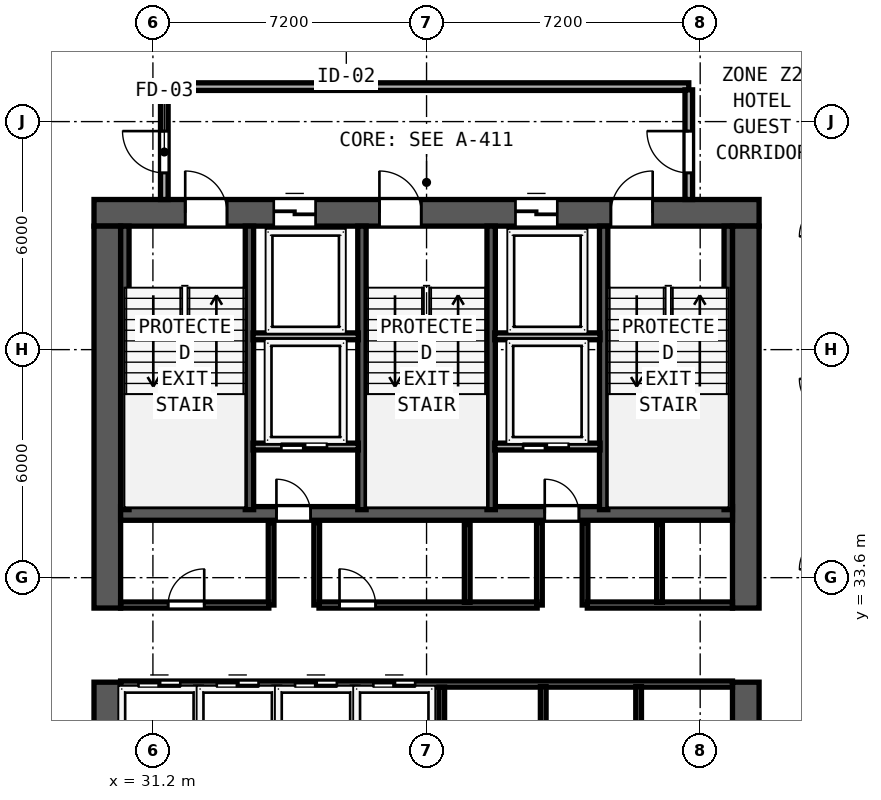
"""IFC4 building model, lengths in metres.
Left out: names, types, materials, properties, quantities, classifications, styles, units other than length and angle.
Written with IfcOpenShell. Run it as: python <this file> out.ifc"""

import sys

from ifc_helpers import new_model, si_unit, direction, frame, frame_2d, origin, place, context, subcontext, project, spatial, rectangle, extrude, element, fill, save


model = new_model("IFC4")
c1 = context("Model", 3, precision=1e-05, world=origin(), true_north=direction((0.0, 1.0)))
c2 = subcontext(c1, "Body", "Model", "MODEL_VIEW")
j1 = project(units=[si_unit("LENGTHUNIT", "METRE"), si_unit("PLANEANGLEUNIT", "RADIAN")], contexts=[c1])
p1 = place(None, origin())
s1 = spatial("IfcSite", under=j1, at=p1, CompositionType="ELEMENT")
p2 = place(p1, origin())
s2 = spatial("IfcBuilding", under=s1, at=p2, CompositionType="ELEMENT")
p3 = place(p2, frame((0.0, 0.0, 121.2)))
s3 = spatial("IfcBuildingStorey", under=s2, at=p3, CompositionType="ELEMENT", Elevation=121.2)
p4 = place(p3, frame((29.65, 43.2, 0.0), z_axis=(0.0, 0.0, 1.0), x_axis=(1.0, 0.0, 0.0)))
e1 = element("IfcWall", 1, at=p4, inside=s3, PredefinedType="SHEAR", context=c2, shape_type="SweptSolid", body=[
    extrude(rectangle(XDim=17.5, YDim=0.7, at=frame_2d((8.75, 0.0))), origin(), (0.0, 0.0, 1.0), 3.6),
])
p5 = place(p4, frame((2.4, 0.0, 0.0)))
e2 = element("IfcOpeningElement", 2, at=p5, cuts=e1, PredefinedType="OPENING", context=c2, shape_type="SweptSolid", body=[
    extrude(rectangle(XDim=1.1, YDim=2.15, at=frame_2d((0.55, 1.075))), frame((0.0, 0.36, 0.0), z_axis=(0.0, -1.0, 0.0), x_axis=(1.0, 0.0, 0.0)), (0.0, 0.0, 1.0), 0.72),
])
p6 = place(p4, frame((7.51, 0.0, 0.0)))
e3 = element("IfcOpeningElement", 3, at=p6, cuts=e1, PredefinedType="OPENING", context=c2, shape_type="SweptSolid", body=[
    extrude(rectangle(XDim=1.1, YDim=2.15, at=frame_2d((0.55, 1.075))), frame((0.0, 0.36, 0.0), z_axis=(0.0, -1.0, 0.0), x_axis=(1.0, 0.0, 0.0)), (0.0, 0.0, 1.0), 0.72),
])
p7 = place(p4, frame((13.6, 0.0, 0.0)))
e4 = element("IfcOpeningElement", 4, at=p7, cuts=e1, PredefinedType="OPENING", context=c2, shape_type="SweptSolid", body=[
    extrude(rectangle(XDim=1.1, YDim=2.15, at=frame_2d((0.55, 1.075))), frame((0.0, 0.36, 0.0), z_axis=(0.0, -1.0, 0.0), x_axis=(1.0, 0.0, 0.0)), (0.0, 0.0, 1.0), 0.72),
])
p8 = place(p4, frame((4.73, 0.0, 0.0)))
e5 = element("IfcOpeningElement", 5, at=p8, cuts=e1, PredefinedType="OPENING", context=c2, shape_type="SweptSolid", body=[
    extrude(rectangle(XDim=1.1, YDim=2.2, at=frame_2d((0.55, 1.1))), frame((0.0, 0.36, 0.0), z_axis=(0.0, -1.0, 0.0), x_axis=(1.0, 0.0, 0.0)), (0.0, 0.0, 1.0), 0.72),
])
p9 = place(p4, frame((11.09, 0.0, 0.0)))
e6 = element("IfcOpeningElement", 6, at=p9, cuts=e1, PredefinedType="OPENING", context=c2, shape_type="SweptSolid", body=[
    extrude(rectangle(XDim=1.1, YDim=2.2, at=frame_2d((0.55, 1.1))), frame((0.0, 0.36, 0.0), z_axis=(0.0, -1.0, 0.0), x_axis=(1.0, 0.0, 0.0)), (0.0, 0.0, 1.0), 0.72),
])
p10 = place(p3, frame((30.0, 26.75, 0.0), z_axis=(0.0, 0.0, 1.0), x_axis=(0.0, 1.0, 0.0)))
e7 = element("IfcWall", 7, at=p10, inside=s3, PredefinedType="SHEAR", context=c2, shape_type="SweptSolid", body=[
    extrude(rectangle(XDim=4.1, YDim=0.7, at=frame_2d((2.05, 0.0))), origin(), (0.0, 0.0, 1.0), 3.6),
])
p11 = place(p3, frame((30.0, 32.8, 0.0), z_axis=(0.0, 0.0, 1.0), x_axis=(0.0, 1.0, 0.0)))
e8 = element("IfcWall", 8, at=p11, inside=s3, PredefinedType="SHEAR", context=c2, shape_type="SweptSolid", body=[
    extrude(rectangle(XDim=10.05, YDim=0.7, at=frame_2d((5.025, 0.0))), origin(), (0.0, 0.0, 1.0), 3.6),
])
p12 = place(p3, frame((46.8, 26.75, 0.0), z_axis=(0.0, 0.0, 1.0), x_axis=(0.0, 1.0, 0.0)))
e9 = element("IfcWall", 9, at=p12, inside=s3, PredefinedType="SHEAR", context=c2, shape_type="SweptSolid", body=[
    extrude(rectangle(XDim=4.1, YDim=0.7, at=frame_2d((2.05, 0.0))), origin(), (0.0, 0.0, 1.0), 3.6),
])
p13 = place(p3, frame((46.8, 32.8, 0.0), z_axis=(0.0, 0.0, 1.0), x_axis=(0.0, 1.0, 0.0)))
e10 = element("IfcWall", 10, at=p13, inside=s3, PredefinedType="SHEAR", context=c2, shape_type="SweptSolid", body=[
    extrude(rectangle(XDim=10.05, YDim=0.7, at=frame_2d((5.025, 0.0))), origin(), (0.0, 0.0, 1.0), 3.6),
])
p14 = place(p3, frame((30.35, 35.29, 0.0), z_axis=(0.0, 0.0, 1.0), x_axis=(1.0, 0.0, 0.0)))
e11 = element("IfcWall", 11, at=p14, inside=s3, PredefinedType="SHEAR", context=c2, shape_type="SweptSolid", body=[
    extrude(rectangle(XDim=16.1, YDim=0.36, at=frame_2d((8.05, 0.0))), origin(), (0.0, 0.0, 1.0), 3.6),
])
p15 = place(p14, frame((5.0, 0.0, 0.0), z_axis=(0.0, 0.0, 1.0), x_axis=(-1.0, 0.0, 0.0)))
e12 = element("IfcOpeningElement", 12, at=p15, cuts=e11, PredefinedType="OPENING", context=c2, shape_type="SweptSolid", body=[
    extrude(rectangle(XDim=0.9, YDim=2.1, at=frame_2d((0.45, 1.05))), frame((0.0, 0.19, 0.0), z_axis=(0.0, -1.0, 0.0), x_axis=(1.0, 0.0, 0.0)), (0.0, 0.0, 1.0), 0.38),
])
p16 = place(p14, frame((12.06, 0.0, 0.0), z_axis=(0.0, 0.0, 1.0), x_axis=(-1.0, 0.0, 0.0)))
e13 = element("IfcOpeningElement", 13, at=p16, cuts=e11, PredefinedType="OPENING", context=c2, shape_type="SweptSolid", body=[
    extrude(rectangle(XDim=0.9, YDim=2.1, at=frame_2d((0.45, 1.05))), frame((0.0, 0.19, 0.0), z_axis=(0.0, -1.0, 0.0), x_axis=(1.0, 0.0, 0.0)), (0.0, 0.0, 1.0), 0.38),
])
for number, where, z_axis, x_axis in (
    (14, (30.462, 35.39, 0.0), (0.0, 0.0, 1.0), (0.0, 1.0, 0.0)),
    (15, (33.74, 35.39, 0.0), (0.0, 0.0, 1.0), (0.0, 1.0, 0.0)),
    (16, (36.7, 35.39, 0.0), (0.0, 0.0, 1.0), (0.0, 1.0, 0.0)),
    (17, (40.1, 35.39, 0.0), (0.0, 0.0, 1.0), (0.0, 1.0, 0.0)),
    (18, (43.06, 35.39, 0.0), (0.0, 0.0, 1.0), (0.0, 1.0, 0.0)),
    (19, (46.338, 35.39, 0.0), (0.0, 0.0, 1.0), (0.0, 1.0, 0.0)),
):
    element("IfcWall", number, at=place(p3, frame(where, z_axis=z_axis, x_axis=x_axis)), inside=s3, PredefinedType="SHEAR", context=c2, shape_type="SweptSolid", body=[
        extrude(rectangle(XDim=7.46, YDim=0.22, at=frame_2d((3.73, 0.0))), origin(), (0.0, 0.0, 1.0), 3.6),
    ])
p17 = place(p3, frame((31.5, 46.52, 0.0), z_axis=(0.0, 0.0, 1.0), x_axis=(1.0, 0.0, 0.0)))
e20 = element("IfcWall", 20, at=p17, inside=s3, PredefinedType="SOLIDWALL", context=c2, shape_type="SweptSolid", body=[
    extrude(rectangle(XDim=13.8, YDim=0.2, at=frame_2d((6.9, 0.0))), origin(), (0.0, 0.0, 1.0), 3.6),
])
p18 = place(p3, frame((31.5, 43.55, 0.0), z_axis=(0.0, 0.0, 1.0), x_axis=(0.0, 1.0, 0.0)))
e21 = element("IfcWall", 21, at=p18, inside=s3, PredefinedType="SOLIDWALL", context=c2, shape_type="SweptSolid", body=[
    extrude(rectangle(XDim=2.885, YDim=0.2, at=frame_2d((1.442, 0.0))), origin(), (0.0, 0.0, 1.0), 3.6),
])
p19 = place(p18, frame((1.8, 0.0, 0.0), z_axis=(0.0, 0.0, 1.0), x_axis=(-1.0, 0.0, 0.0)))
e22 = element("IfcOpeningElement", 22, at=p19, cuts=e21, PredefinedType="OPENING", context=c2, shape_type="SweptSolid", body=[
    extrude(rectangle(XDim=1.1, YDim=2.15, at=frame_2d((0.55, 1.075))), frame((0.0, 0.11, 0.0), z_axis=(0.0, -1.0, 0.0), x_axis=(1.0, 0.0, 0.0)), (0.0, 0.0, 1.0), 0.22),
])
p20 = place(p3, frame((45.3, 43.55, 0.0), z_axis=(0.0, 0.0, 1.0), x_axis=(0.0, 1.0, 0.0)))
e23 = element("IfcWall", 23, at=p20, inside=s3, PredefinedType="SOLIDWALL", context=c2, shape_type="SweptSolid", body=[
    extrude(rectangle(XDim=2.885, YDim=0.2, at=frame_2d((1.442, 0.0))), origin(), (0.0, 0.0, 1.0), 3.6),
])
p21 = place(p20, frame((0.7, 0.0, 0.0)))
e24 = element("IfcOpeningElement", 24, at=p21, cuts=e23, PredefinedType="OPENING", context=c2, shape_type="SweptSolid", body=[
    extrude(rectangle(XDim=1.1, YDim=2.15, at=frame_2d((0.55, 1.075))), frame((0.0, 0.11, 0.0), z_axis=(0.0, -1.0, 0.0), x_axis=(1.0, 0.0, 0.0)), (0.0, 0.0, 1.0), 0.22),
])
for number, where, z_axis, x_axis in (
    (25, (33.835, 39.95, 0.0), (0.0, 0.0, 1.0), (1.0, 0.0, 0.0)),
    (26, (40.195, 39.95, 0.0), (0.0, 0.0, 1.0), (1.0, 0.0, 0.0)),
):
    element("IfcWall", number, at=place(p3, frame(where, z_axis=z_axis, x_axis=x_axis)), inside=s3, PredefinedType="SOLIDWALL", context=c2, shape_type="SweptSolid", body=[
        extrude(rectangle(XDim=2.77, YDim=0.18, at=frame_2d((1.385, 0.0))), origin(), (0.0, 0.0, 1.0), 3.6),
    ])
p22 = place(p3, frame((33.835, 37.05, 0.0), z_axis=(0.0, 0.0, 1.0), x_axis=(1.0, 0.0, 0.0)))
e27 = element("IfcWall", 27, at=p22, inside=s3, PredefinedType="SOLIDWALL", context=c2, shape_type="SweptSolid", body=[
    extrude(rectangle(XDim=2.77, YDim=0.18, at=frame_2d((1.385, 0.0))), origin(), (0.0, 0.0, 1.0), 3.6),
])
p23 = place(p22, frame((1.945, 0.0, 0.0), z_axis=(0.0, 0.0, 1.0), x_axis=(-1.0, 0.0, 0.0)))
e28 = element("IfcOpeningElement", 28, at=p23, cuts=e27, PredefinedType="OPENING", context=c2, shape_type="SweptSolid", body=[
    extrude(rectangle(XDim=1.2, YDim=2.2, at=frame_2d((0.6, 1.1))), frame((0.0, 0.1, 0.0), z_axis=(0.0, -1.0, 0.0), x_axis=(1.0, 0.0, 0.0)), (0.0, 0.0, 1.0), 0.2),
])
for number, where, z_axis, x_axis in (
    (29, (34.31, 32.88, 0.0), (0.0, 0.0, 1.0), (0.0, 1.0, 0.0)),
    (30, (35.51, 32.88, 0.0), (0.0, 0.0, 1.0), (0.0, 1.0, 0.0)),
):
    element("IfcWall", number, at=place(p3, frame(where, z_axis=z_axis, x_axis=x_axis)), inside=s3, PredefinedType="SOLIDWALL", context=c2, shape_type="SweptSolid", body=[
        extrude(rectangle(XDim=2.17, YDim=0.15, at=frame_2d((1.085, 0.0))), origin(), (0.0, 0.0, 1.0), 3.6),
    ])
p24 = place(p3, frame((40.195, 37.05, 0.0), z_axis=(0.0, 0.0, 1.0), x_axis=(1.0, 0.0, 0.0)))
e31 = element("IfcWall", 31, at=p24, inside=s3, PredefinedType="SOLIDWALL", context=c2, shape_type="SweptSolid", body=[
    extrude(rectangle(XDim=2.77, YDim=0.18, at=frame_2d((1.385, 0.0))), origin(), (0.0, 0.0, 1.0), 3.6),
])
p25 = place(p24, frame((1.945, 0.0, 0.0), z_axis=(0.0, 0.0, 1.0), x_axis=(-1.0, 0.0, 0.0)))
e32 = element("IfcOpeningElement", 32, at=p25, cuts=e31, PredefinedType="OPENING", context=c2, shape_type="SweptSolid", body=[
    extrude(rectangle(XDim=1.2, YDim=2.2, at=frame_2d((0.6, 1.1))), frame((0.0, 0.1, 0.0), z_axis=(0.0, -1.0, 0.0), x_axis=(1.0, 0.0, 0.0)), (0.0, 0.0, 1.0), 0.2),
])
for number, where, z_axis, x_axis in (
    (33, (41.37, 32.88, 0.0), (0.0, 0.0, 1.0), (0.0, 1.0, 0.0)),
    (34, (42.57, 32.88, 0.0), (0.0, 0.0, 1.0), (0.0, 1.0, 0.0)),
):
    element("IfcWall", number, at=place(p3, frame(where, z_axis=z_axis, x_axis=x_axis)), inside=s3, PredefinedType="SOLIDWALL", context=c2, shape_type="SweptSolid", body=[
        extrude(rectangle(XDim=2.17, YDim=0.15, at=frame_2d((1.085, 0.0))), origin(), (0.0, 0.0, 1.0), 3.6),
    ])
p26 = place(p3, frame((30.35, 32.88, 0.0), z_axis=(0.0, 0.0, 1.0), x_axis=(1.0, 0.0, 0.0)))
e35 = element("IfcWall", 35, at=p26, inside=s3, PredefinedType="SOLIDWALL", context=c2, shape_type="SweptSolid", body=[
    extrude(rectangle(XDim=3.9, YDim=0.16, at=frame_2d((1.95, 0.0))), origin(), (0.0, 0.0, 1.0), 3.6),
])
p27 = place(p26, frame((2.2, 0.0, 0.0), z_axis=(0.0, 0.0, 1.0), x_axis=(-1.0, 0.0, 0.0)))
e36 = element("IfcOpeningElement", 36, at=p27, cuts=e35, PredefinedType="OPENING", context=c2, shape_type="SweptSolid", body=[
    extrude(rectangle(XDim=0.95, YDim=2.12, at=frame_2d((0.475, 1.06))), frame((0.0, 0.09, 0.0), z_axis=(0.0, -1.0, 0.0), x_axis=(1.0, 0.0, 0.0)), (0.0, 0.0, 1.0), 0.18),
])
p28 = place(p3, frame((35.57, 32.88, 0.0), z_axis=(0.0, 0.0, 1.0), x_axis=(1.0, 0.0, 0.0)))
e37 = element("IfcWall", 37, at=p28, inside=s3, PredefinedType="SOLIDWALL", context=c2, shape_type="SweptSolid", body=[
    extrude(rectangle(XDim=5.74, YDim=0.16, at=frame_2d((2.87, 0.0))), origin(), (0.0, 0.0, 1.0), 3.6),
])
p29 = place(p28, frame((1.49, 0.0, 0.0), z_axis=(0.0, 0.0, 1.0), x_axis=(-1.0, 0.0, 0.0)))
e38 = element("IfcOpeningElement", 38, at=p29, cuts=e37, PredefinedType="OPENING", context=c2, shape_type="SweptSolid", body=[
    extrude(rectangle(XDim=0.95, YDim=2.12, at=frame_2d((0.475, 1.06))), frame((0.0, 0.09, 0.0), z_axis=(0.0, -1.0, 0.0), x_axis=(1.0, 0.0, 0.0)), (0.0, 0.0, 1.0), 0.18),
])
p30 = place(p3, frame((42.63, 32.88, 0.0), z_axis=(0.0, 0.0, 1.0), x_axis=(1.0, 0.0, 0.0)))
e39 = element("IfcWall", 39, at=p30, inside=s3, PredefinedType="SOLIDWALL", context=c2, shape_type="SweptSolid", body=[
    extrude(rectangle(XDim=3.82, YDim=0.16, at=frame_2d((1.91, 0.0))), origin(), (0.0, 0.0, 1.0), 3.6),
])
for number, where, z_axis, x_axis in (
    (40, (39.47, 32.95, 0.0), (0.0, 0.0, 1.0), (0.0, 1.0, 0.0)),
    (41, (44.53, 32.95, 0.0), (0.0, 0.0, 1.0), (0.0, 1.0, 0.0)),
):
    element("IfcWall", number, at=place(p3, frame(where, z_axis=z_axis, x_axis=x_axis)), inside=s3, PredefinedType="SOLIDWALL", context=c2, shape_type="SweptSolid", body=[
        extrude(rectangle(XDim=2.05, YDim=0.15, at=frame_2d((1.025, 0.0))), origin(), (0.0, 0.0, 1.0), 3.6),
    ])
p31 = place(p3, frame((30.35, 30.8, 0.0), z_axis=(0.0, 0.0, 1.0), x_axis=(1.0, 0.0, 0.0)))
e42 = element("IfcWall", 42, at=p31, inside=s3, PredefinedType="SOLIDWALL", context=c2, shape_type="SweptSolid", body=[
    extrude(rectangle(XDim=16.1, YDim=0.16, at=frame_2d((8.05, 0.0))), origin(), (0.0, 0.0, 1.0), 3.6),
])
p32 = place(p31, frame((0.47, 0.0, 0.0)))
e43 = element("IfcOpeningElement", 43, at=p32, cuts=e42, PredefinedType="OPENING", context=c2, shape_type="SweptSolid", body=[
    extrude(rectangle(XDim=1.1, YDim=2.2, at=frame_2d((0.55, 1.1))), frame((0.0, 0.09, 0.0), z_axis=(0.0, -1.0, 0.0), x_axis=(1.0, 0.0, 0.0)), (0.0, 0.0, 1.0), 0.18),
])
p33 = place(p31, frame((2.53, 0.0, 0.0)))
e44 = element("IfcOpeningElement", 44, at=p33, cuts=e42, PredefinedType="OPENING", context=c2, shape_type="SweptSolid", body=[
    extrude(rectangle(XDim=1.1, YDim=2.2, at=frame_2d((0.55, 1.1))), frame((0.0, 0.09, 0.0), z_axis=(0.0, -1.0, 0.0), x_axis=(1.0, 0.0, 0.0)), (0.0, 0.0, 1.0), 0.18),
])
p34 = place(p31, frame((4.59, 0.0, 0.0)))
e45 = element("IfcOpeningElement", 45, at=p34, cuts=e42, PredefinedType="OPENING", context=c2, shape_type="SweptSolid", body=[
    extrude(rectangle(XDim=1.1, YDim=2.2, at=frame_2d((0.55, 1.1))), frame((0.0, 0.09, 0.0), z_axis=(0.0, -1.0, 0.0), x_axis=(1.0, 0.0, 0.0)), (0.0, 0.0, 1.0), 0.18),
])
p35 = place(p31, frame((6.65, 0.0, 0.0)))
e46 = element("IfcOpeningElement", 46, at=p35, cuts=e42, PredefinedType="OPENING", context=c2, shape_type="SweptSolid", body=[
    extrude(rectangle(XDim=1.1, YDim=2.2, at=frame_2d((0.55, 1.1))), frame((0.0, 0.09, 0.0), z_axis=(0.0, -1.0, 0.0), x_axis=(1.0, 0.0, 0.0)), (0.0, 0.0, 1.0), 0.18),
])
for number, where, z_axis, x_axis in (
    (47, (32.4, 28.735, 0.0), (0.0, 0.0, 1.0), (0.0, 1.0, 0.0)),
    (48, (34.46, 28.735, 0.0), (0.0, 0.0, 1.0), (0.0, 1.0, 0.0)),
    (49, (36.52, 28.735, 0.0), (0.0, 0.0, 1.0), (0.0, 1.0, 0.0)),
    (50, (38.8, 28.735, 0.0), (0.0, 0.0, 1.0), (0.0, 1.0, 0.0)),
):
    element("IfcWall", number, at=place(p3, frame(where, z_axis=z_axis, x_axis=x_axis)), inside=s3, PredefinedType="SOLIDWALL", context=c2, shape_type="SweptSolid", body=[
        extrude(rectangle(XDim=1.985, YDim=0.15, at=frame_2d((0.992, 0.0))), origin(), (0.0, 0.0, 1.0), 3.6),
    ])
for number, where, z_axis, x_axis in (
    (51, (41.47, 28.75, 0.0), (0.0, 0.0, 1.0), (0.0, 1.0, 0.0)),
    (52, (43.98, 28.75, 0.0), (0.0, 0.0, 1.0), (0.0, 1.0, 0.0)),
):
    element("IfcWall", number, at=place(p3, frame(where, z_axis=z_axis, x_axis=x_axis)), inside=s3, PredefinedType="SOLIDWALL", context=c2, shape_type="SweptSolid", body=[
        extrude(rectangle(XDim=1.985, YDim=0.15, at=frame_2d((0.993, 0.0))), origin(), (0.0, 0.0, 1.0), 3.6),
    ])
p36 = place(p5, origin())
e53 = element("IfcDoor", 53, at=p36, inside=s3, OperationType="SINGLE_SWING_LEFT", PredefinedType="DOOR", context=c2, shape_type="SweptSolid", body=[
    extrude(rectangle(XDim=1.1, YDim=2.15, at=frame_2d((0.55, 1.075))), frame((0.0, 0.185, 0.0), z_axis=(0.0, -1.0, 0.0), x_axis=(1.0, 0.0, 0.0)), (0.0, 0.0, 1.0), 0.05),
])
fill(e2, e53)
p37 = place(p6, origin())
e54 = element("IfcDoor", 54, at=p37, inside=s3, OperationType="SINGLE_SWING_LEFT", PredefinedType="DOOR", context=c2, shape_type="SweptSolid", body=[
    extrude(rectangle(XDim=1.1, YDim=2.15, at=frame_2d((0.55, 1.075))), frame((0.0, 0.185, 0.0), z_axis=(0.0, -1.0, 0.0), x_axis=(1.0, 0.0, 0.0)), (0.0, 0.0, 1.0), 0.05),
])
fill(e3, e54)
p38 = place(p7, origin())
e55 = element("IfcDoor", 55, at=p38, inside=s3, OperationType="SINGLE_SWING_RIGHT", PredefinedType="DOOR", context=c2, shape_type="SweptSolid", body=[
    extrude(rectangle(XDim=1.1, YDim=2.15, at=frame_2d((0.55, 1.075))), frame((0.0, 0.185, 0.0), z_axis=(0.0, -1.0, 0.0), x_axis=(1.0, 0.0, 0.0)), (0.0, 0.0, 1.0), 0.05),
])
fill(e4, e55)
p39 = place(p19, origin())
e56 = element("IfcDoor", 56, at=p39, inside=s3, OperationType="SINGLE_SWING_LEFT", PredefinedType="DOOR", context=c2, shape_type="SweptSolid", body=[
    extrude(rectangle(XDim=1.1, YDim=2.15, at=frame_2d((0.55, 1.075))), frame((0.0, 0.025, 0.0), z_axis=(0.0, -1.0, 0.0), x_axis=(1.0, 0.0, 0.0)), (0.0, 0.0, 1.0), 0.05),
])
fill(e22, e56)
p40 = place(p21, origin())
e57 = element("IfcDoor", 57, at=p40, inside=s3, OperationType="SINGLE_SWING_RIGHT", PredefinedType="DOOR", context=c2, shape_type="SweptSolid", body=[
    extrude(rectangle(XDim=1.1, YDim=2.15, at=frame_2d((0.55, 1.075))), frame((0.0, 0.025, 0.0), z_axis=(0.0, -1.0, 0.0), x_axis=(1.0, 0.0, 0.0)), (0.0, 0.0, 1.0), 0.05),
])
fill(e24, e57)
p41 = place(p8, origin())
e58 = element("IfcDoor", 58, at=p41, inside=s3, OperationType="SLIDING_TO_LEFT", PredefinedType="DOOR", context=c2, shape_type="SweptSolid", body=[
    extrude(rectangle(XDim=1.1, YDim=2.2, at=frame_2d((0.55, 1.1))), frame((0.0, 0.185, 0.0), z_axis=(0.0, -1.0, 0.0), x_axis=(1.0, 0.0, 0.0)), (0.0, 0.0, 1.0), 0.05),
])
fill(e5, e58)
p42 = place(p9, origin())
e59 = element("IfcDoor", 59, at=p42, inside=s3, OperationType="SLIDING_TO_LEFT", PredefinedType="DOOR", context=c2, shape_type="SweptSolid", body=[
    extrude(rectangle(XDim=1.1, YDim=2.2, at=frame_2d((0.55, 1.1))), frame((0.0, 0.185, 0.0), z_axis=(0.0, -1.0, 0.0), x_axis=(1.0, 0.0, 0.0)), (0.0, 0.0, 1.0), 0.05),
])
fill(e6, e59)
p43 = place(p23, origin())
e60 = element("IfcDoor", 60, at=p43, inside=s3, OperationType="SLIDING_TO_RIGHT", PredefinedType="DOOR", context=c2, shape_type="SweptSolid", body=[
    extrude(rectangle(XDim=1.2, YDim=2.2, at=frame_2d((0.6, 1.1))), frame((0.0, 0.025, 0.0), z_axis=(0.0, -1.0, 0.0), x_axis=(1.0, 0.0, 0.0)), (0.0, 0.0, 1.0), 0.05),
])
fill(e28, e60)
p44 = place(p15, origin())
e61 = element("IfcDoor", 61, at=p44, inside=s3, OperationType="SINGLE_SWING_RIGHT", PredefinedType="DOOR", context=c2, shape_type="SweptSolid", body=[
    extrude(rectangle(XDim=0.9, YDim=2.1, at=frame_2d((0.45, 1.05))), frame((0.0, 0.025, 0.0), z_axis=(0.0, -1.0, 0.0), x_axis=(1.0, 0.0, 0.0)), (0.0, 0.0, 1.0), 0.05),
])
fill(e12, e61)
p45 = place(p25, origin())
e62 = element("IfcDoor", 62, at=p45, inside=s3, OperationType="SLIDING_TO_RIGHT", PredefinedType="DOOR", context=c2, shape_type="SweptSolid", body=[
    extrude(rectangle(XDim=1.2, YDim=2.2, at=frame_2d((0.6, 1.1))), frame((0.0, 0.025, 0.0), z_axis=(0.0, -1.0, 0.0), x_axis=(1.0, 0.0, 0.0)), (0.0, 0.0, 1.0), 0.05),
])
fill(e32, e62)
p46 = place(p16, origin())
e63 = element("IfcDoor", 63, at=p46, inside=s3, OperationType="SINGLE_SWING_RIGHT", PredefinedType="DOOR", context=c2, shape_type="SweptSolid", body=[
    extrude(rectangle(XDim=0.9, YDim=2.1, at=frame_2d((0.45, 1.05))), frame((0.0, 0.025, 0.0), z_axis=(0.0, -1.0, 0.0), x_axis=(1.0, 0.0, 0.0)), (0.0, 0.0, 1.0), 0.05),
])
fill(e13, e63)
p47 = place(p27, origin())
e64 = element("IfcDoor", 64, at=p47, inside=s3, OperationType="SINGLE_SWING_LEFT", PredefinedType="DOOR", context=c2, shape_type="SweptSolid", body=[
    extrude(rectangle(XDim=0.95, YDim=2.12, at=frame_2d((0.475, 1.06))), frame((0.0, 0.025, 0.0), z_axis=(0.0, -1.0, 0.0), x_axis=(1.0, 0.0, 0.0)), (0.0, 0.0, 1.0), 0.05),
])
fill(e36, e64)
p48 = place(p29, origin())
e65 = element("IfcDoor", 65, at=p48, inside=s3, OperationType="SINGLE_SWING_RIGHT", PredefinedType="DOOR", context=c2, shape_type="SweptSolid", body=[
    extrude(rectangle(XDim=0.95, YDim=2.12, at=frame_2d((0.475, 1.06))), frame((0.0, 0.025, 0.0), z_axis=(0.0, -1.0, 0.0), x_axis=(1.0, 0.0, 0.0)), (0.0, 0.0, 1.0), 0.05),
])
fill(e38, e65)
p49 = place(p32, origin())
e66 = element("IfcDoor", 66, at=p49, inside=s3, OperationType="SLIDING_TO_LEFT", PredefinedType="DOOR", context=c2, shape_type="SweptSolid", body=[
    extrude(rectangle(XDim=1.1, YDim=2.2, at=frame_2d((0.55, 1.1))), frame((0.0, 0.025, 0.0), z_axis=(0.0, -1.0, 0.0), x_axis=(1.0, 0.0, 0.0)), (0.0, 0.0, 1.0), 0.05),
])
fill(e43, e66)
p50 = place(p33, origin())
e67 = element("IfcDoor", 67, at=p50, inside=s3, OperationType="SLIDING_TO_LEFT", PredefinedType="DOOR", context=c2, shape_type="SweptSolid", body=[
    extrude(rectangle(XDim=1.1, YDim=2.2, at=frame_2d((0.55, 1.1))), frame((0.0, 0.025, 0.0), z_axis=(0.0, -1.0, 0.0), x_axis=(1.0, 0.0, 0.0)), (0.0, 0.0, 1.0), 0.05),
])
fill(e44, e67)
p51 = place(p34, origin())
e68 = element("IfcDoor", 68, at=p51, inside=s3, OperationType="SLIDING_TO_LEFT", PredefinedType="DOOR", context=c2, shape_type="SweptSolid", body=[
    extrude(rectangle(XDim=1.1, YDim=2.2, at=frame_2d((0.55, 1.1))), frame((0.0, 0.025, 0.0), z_axis=(0.0, -1.0, 0.0), x_axis=(1.0, 0.0, 0.0)), (0.0, 0.0, 1.0), 0.05),
])
fill(e45, e68)
p52 = place(p35, origin())
e69 = element("IfcDoor", 69, at=p52, inside=s3, OperationType="SLIDING_TO_LEFT", PredefinedType="DOOR", context=c2, shape_type="SweptSolid", body=[
    extrude(rectangle(XDim=1.1, YDim=2.2, at=frame_2d((0.55, 1.1))), frame((0.0, 0.025, 0.0), z_axis=(0.0, -1.0, 0.0), x_axis=(1.0, 0.0, 0.0)), (0.0, 0.0, 1.0), 0.05),
])
fill(e46, e69)
save(model, sys.argv[1])
